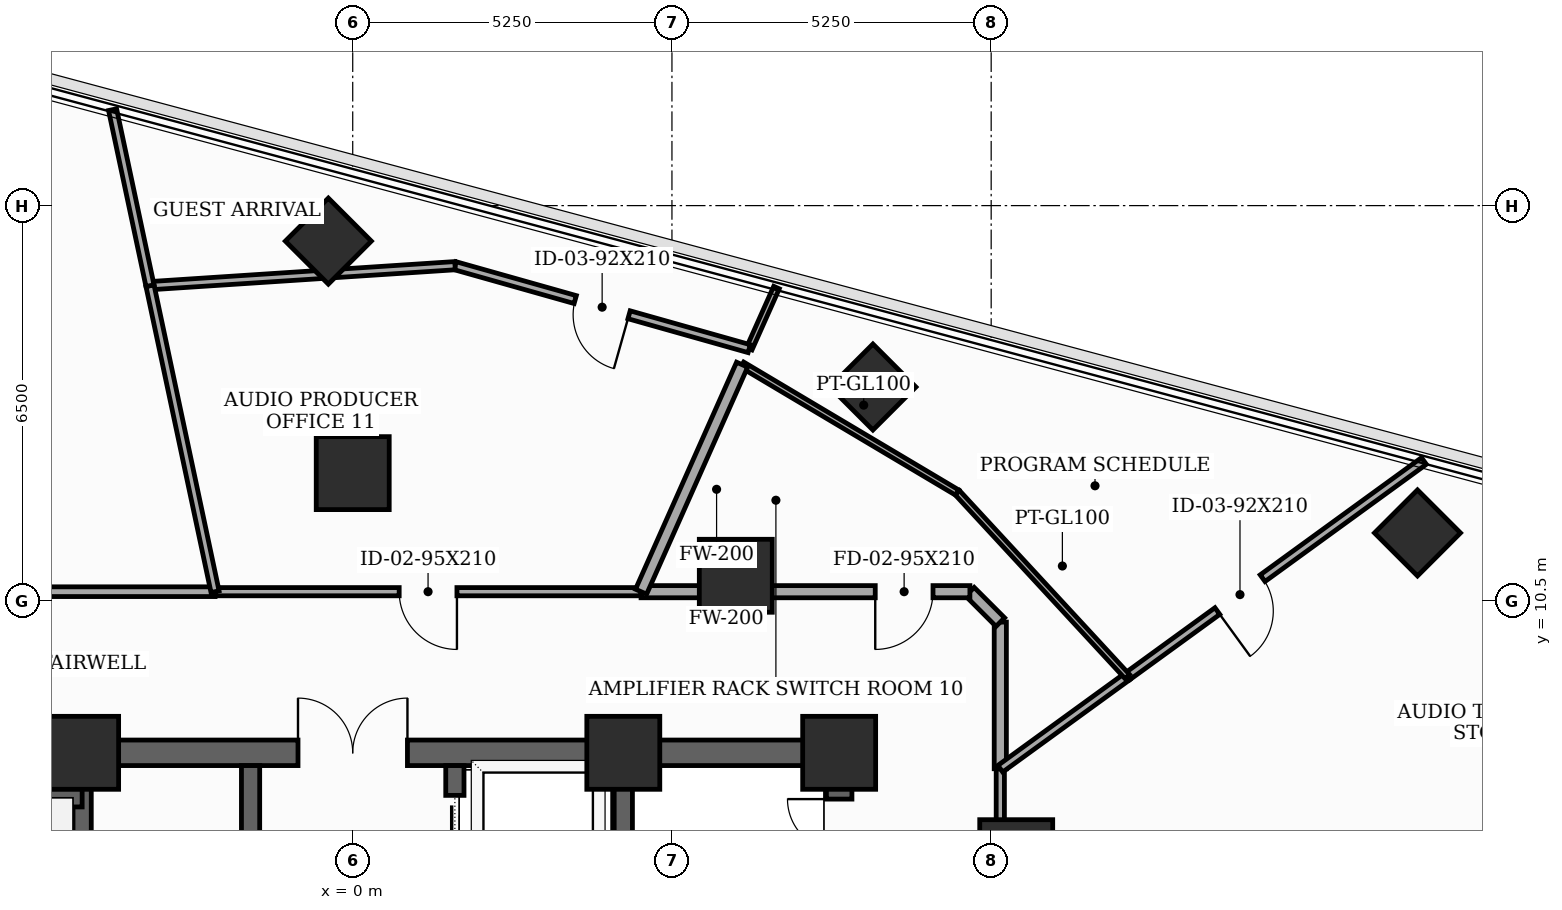
"""IFC4 building model, lengths in metres.
Left out: names, types, materials, properties, quantities, classifications, styles, units other than length and angle.
Written with IfcOpenShell. Run it as: python <this file> out.ifc"""

import sys

from ifc_helpers import new_model, si_unit, direction, frame, frame_2d, origin, origin_2d, place, context, subcontext, project, spatial, rectangle, extrude, element, fill, save


model = new_model("IFC4")
c1 = context("Model", 3, precision=1e-05, world=origin(), true_north=direction((0.0, 1.0)))
c2 = subcontext(c1, "Body", "Model", "MODEL_VIEW")
j1 = project(units=[si_unit("LENGTHUNIT", "METRE"), si_unit("PLANEANGLEUNIT", "RADIAN")], contexts=[c1])
p1 = place(None, origin())
s1 = spatial("IfcSite", under=j1, at=p1, CompositionType="ELEMENT")
p2 = place(p1, origin())
s2 = spatial("IfcBuilding", under=s1, at=p2, CompositionType="ELEMENT")
p3 = place(p2, frame((0.0, 0.0, 187.9)))
s3 = spatial("IfcBuildingStorey", under=s2, at=p3, CompositionType="ELEMENT", Elevation=187.9)
for number, where, z_axis, x_axis in (
    (1, (8.0, 8.0, 0.0), (0.0, 0.0, 1.0), (1.0, 0.0, 0.0)),
    (2, (4.45, 8.0, 0.0), (0.0, 0.0, 1.0), (1.0, 0.0, 0.0)),
    (3, (-4.45, 8.0, 0.0), (0.0, 0.0, 1.0), (1.0, 0.0, 0.0)),
    (4, (10.912, 6.3, 0.0), (0.0, 0.0, 1.0), (1.0, 0.0, 0.0)),
    (5, (6.3, 10.912, 0.0), (0.0, 0.0, 1.0), (1.0, 0.0, 0.0)),
    (6, (0.0, 12.6, 0.0), (0.0, 0.0, 1.0), (1.0, 0.0, 0.0)),
):
    element("IfcColumn", number, at=place(p3, frame(where, z_axis=z_axis, x_axis=x_axis)), inside=s3, PredefinedType="COLUMN", context=c2, shape_type="SweptSolid", body=[
        extrude(rectangle(XDim=1.2, YDim=1.2, at=origin_2d()), origin(), (0.0, 0.0, 1.0), 3.7),
    ])
for number, where, z_axis, x_axis in (
    (7, (17.511, 11.616, 0.0), (0.0, 0.0, 1.0), (0.707, 0.707, 0.0)),
    (8, (8.555, 14.016, 0.0), (0.0, 0.0, 1.0), (0.707, 0.707, 0.0)),
    (9, (-0.401, 16.416, 0.0), (0.0, 0.0, 1.0), (0.707, 0.707, 0.0)),
):
    element("IfcColumn", number, at=place(p3, frame(where, z_axis=z_axis, x_axis=x_axis)), inside=s3, PredefinedType="COLUMN", context=c2, shape_type="SweptSolid", body=[
        extrude(rectangle(XDim=1.0, YDim=1.0, at=origin_2d()), origin(), (0.0, 0.0, 1.0), 3.7),
    ])
p4 = place(p3, frame((8.0, -8.0, 0.0), z_axis=(0.0, 0.0, 1.0), x_axis=(0.0, 1.0, 0.0)))
e10 = element("IfcWall", 10, at=p4, inside=s3, PredefinedType="SHEAR", context=c2, shape_type="SweptSolid", body=[
    extrude(rectangle(XDim=16.0, YDim=0.42, at=frame_2d((8.0, 0.0))), origin(), (0.0, 0.0, 1.0), 3.5),
])
p5 = place(p4, frame((9.6, 0.0, 0.0)))
e11 = element("IfcOpeningElement", 11, at=p5, cuts=e10, PredefinedType="OPENING", context=c2, shape_type="SweptSolid", body=[
    extrude(rectangle(XDim=1.05, YDim=2.15, at=frame_2d((0.525, 1.075))), frame((0.0, 0.22, 0.0), z_axis=(0.0, -1.0, 0.0), x_axis=(1.0, 0.0, 0.0)), (0.0, 0.0, 1.0), 0.44),
])
p6 = place(p4, frame((14.389, 0.0, 0.0)))
e12 = element("IfcOpeningElement", 12, at=p6, cuts=e10, PredefinedType="OPENING", context=c2, shape_type="SweptSolid", body=[
    extrude(rectangle(XDim=0.85, YDim=2.02, at=frame_2d((0.425, 1.01))), frame((0.0, 0.22, 0.0), z_axis=(0.0, -1.0, 0.0), x_axis=(1.0, 0.0, 0.0)), (0.0, 0.0, 1.0), 0.44),
])
p7 = place(p3, frame((-8.0, 8.0, 0.0), z_axis=(0.0, 0.0, 1.0), x_axis=(1.0, 0.0, 0.0)))
e13 = element("IfcWall", 13, at=p7, inside=s3, PredefinedType="SHEAR", context=c2, shape_type="SweptSolid", body=[
    extrude(rectangle(XDim=16.0, YDim=0.42, at=frame_2d((8.0, 0.0))), origin(), (0.0, 0.0, 1.0), 3.5),
])
p8 = place(p7, frame((7.1, 0.0, 0.0)))
e14 = element("IfcOpeningElement", 14, at=p8, cuts=e13, PredefinedType="OPENING", context=c2, shape_type="SweptSolid", body=[
    extrude(rectangle(XDim=1.8, YDim=2.15, at=frame_2d((0.9, 1.075))), frame((0.0, 0.22, 0.0), z_axis=(0.0, -1.0, 0.0), x_axis=(1.0, 0.0, 0.0)), (0.0, 0.0, 1.0), 0.44),
])
for number, where, z_axis, x_axis in (
    (15, (-4.45, -7.79, 0.0), (0.0, 0.0, 1.0), (0.0, 1.0, 0.0)),
    (16, (4.45, -7.79, 0.0), (0.0, 0.0, 1.0), (0.0, 1.0, 0.0)),
):
    element("IfcWall", number, at=place(p3, frame(where, z_axis=z_axis, x_axis=x_axis)), inside=s3, PredefinedType="SHEAR", context=c2, shape_type="SweptSolid", body=[
        extrude(rectangle(XDim=15.58, YDim=0.3, at=frame_2d((7.79, 0.0))), origin(), (0.0, 0.0, 1.0), 3.5),
    ])
p9 = place(p3, frame((-7.79, 7.26, 0.0), z_axis=(0.0, 0.0, 1.0), x_axis=(1.0, 0.0, 0.0)))
e17 = element("IfcWall", 17, at=p9, inside=s3, PredefinedType="SHEAR", context=c2, shape_type="SweptSolid", body=[
    extrude(rectangle(XDim=3.34, YDim=0.3, at=frame_2d((1.67, 0.0))), origin(), (0.0, 0.0, 1.0), 3.5),
])
p10 = place(p3, frame((-1.68, -4.85, 0.0), z_axis=(0.0, 0.0, 1.0), x_axis=(0.0, 1.0, 0.0)))
e18 = element("IfcWall", 18, at=p10, inside=s3, PredefinedType="SHEAR", context=c2, shape_type="SweptSolid", body=[
    extrude(rectangle(XDim=12.64, YDim=0.3, at=frame_2d((6.32, 0.0))), origin(), (0.0, 0.0, 1.0), 3.5),
])
p11 = place(p10, frame((2.6, 0.0, 0.0)))
e19 = element("IfcOpeningElement", 19, at=p11, cuts=e18, PredefinedType="OPENING", context=c2, shape_type="SweptSolid", body=[
    extrude(rectangle(XDim=0.95, YDim=2.1, at=frame_2d((0.475, 1.05))), frame((0.0, 0.16, 0.0), z_axis=(0.0, -1.0, 0.0), x_axis=(1.0, 0.0, 0.0)), (0.0, 0.0, 1.0), 0.32),
])
p12 = place(p10, frame((8.8, 0.0, 0.0)))
e20 = element("IfcOpeningElement", 20, at=p12, cuts=e18, PredefinedType="OPENING", context=c2, shape_type="SweptSolid", body=[
    extrude(rectangle(XDim=0.95, YDim=2.1, at=frame_2d((0.475, 1.05))), frame((0.0, 0.16, 0.0), z_axis=(0.0, -1.0, 0.0), x_axis=(1.0, 0.0, 0.0)), (0.0, 0.0, 1.0), 0.32),
])
p13 = place(p3, frame((1.68, -4.85, 0.0), z_axis=(0.0, 0.0, 1.0), x_axis=(0.0, 1.0, 0.0)))
e21 = element("IfcWall", 21, at=p13, inside=s3, PredefinedType="SHEAR", context=c2, shape_type="SweptSolid", body=[
    extrude(rectangle(XDim=12.64, YDim=0.3, at=frame_2d((6.32, 0.0))), origin(), (0.0, 0.0, 1.0), 3.5),
])
p14 = place(p13, frame((0.55, 0.0, 0.0)))
e22 = element("IfcOpeningElement", 22, at=p14, cuts=e21, PredefinedType="OPENING", context=c2, shape_type="SweptSolid", body=[
    extrude(rectangle(XDim=1.1, YDim=2.1, at=frame_2d((0.55, 1.05))), frame((0.0, 0.16, 0.0), z_axis=(0.0, -1.0, 0.0), x_axis=(1.0, 0.0, 0.0)), (0.0, 0.0, 1.0), 0.32),
])
p15 = place(p13, frame((2.65, 0.0, 0.0)))
e23 = element("IfcOpeningElement", 23, at=p15, cuts=e21, PredefinedType="OPENING", context=c2, shape_type="SweptSolid", body=[
    extrude(rectangle(XDim=1.1, YDim=2.1, at=frame_2d((0.55, 1.05))), frame((0.0, 0.16, 0.0), z_axis=(0.0, -1.0, 0.0), x_axis=(1.0, 0.0, 0.0)), (0.0, 0.0, 1.0), 0.32),
])
p16 = place(p13, frame((4.75, 0.0, 0.0)))
e24 = element("IfcOpeningElement", 24, at=p16, cuts=e21, PredefinedType="OPENING", context=c2, shape_type="SweptSolid", body=[
    extrude(rectangle(XDim=1.1, YDim=2.1, at=frame_2d((0.55, 1.05))), frame((0.0, 0.16, 0.0), z_axis=(0.0, -1.0, 0.0), x_axis=(1.0, 0.0, 0.0)), (0.0, 0.0, 1.0), 0.32),
])
p17 = place(p13, frame((6.85, 0.0, 0.0)))
e25 = element("IfcOpeningElement", 25, at=p17, cuts=e21, PredefinedType="OPENING", context=c2, shape_type="SweptSolid", body=[
    extrude(rectangle(XDim=1.1, YDim=2.1, at=frame_2d((0.55, 1.05))), frame((0.0, 0.16, 0.0), z_axis=(0.0, -1.0, 0.0), x_axis=(1.0, 0.0, 0.0)), (0.0, 0.0, 1.0), 0.32),
])
p18 = place(p13, frame((8.95, 0.0, 0.0)))
e26 = element("IfcOpeningElement", 26, at=p18, cuts=e21, PredefinedType="OPENING", context=c2, shape_type="SweptSolid", body=[
    extrude(rectangle(XDim=1.1, YDim=2.1, at=frame_2d((0.55, 1.05))), frame((0.0, 0.16, 0.0), z_axis=(0.0, -1.0, 0.0), x_axis=(1.0, 0.0, 0.0)), (0.0, 0.0, 1.0), 0.32),
])
p19 = place(p13, frame((11.05, 0.0, 0.0)))
e27 = element("IfcOpeningElement", 27, at=p19, cuts=e21, PredefinedType="OPENING", context=c2, shape_type="SweptSolid", body=[
    extrude(rectangle(XDim=1.1, YDim=2.1, at=frame_2d((0.55, 1.05))), frame((0.0, 0.16, 0.0), z_axis=(0.0, -1.0, 0.0), x_axis=(1.0, 0.0, 0.0)), (0.0, 0.0, 1.0), 0.32),
])
p20 = place(p3, frame((10.65, 2.45, 0.0), z_axis=(0.0, 0.0, 1.0), x_axis=(0.0, 1.0, 0.0)))
e28 = element("IfcWall", 28, at=p20, inside=s3, PredefinedType="PARTITIONING", context=c2, shape_type="SweptSolid", body=[
    extrude(rectangle(XDim=5.288, YDim=0.135, at=frame_2d((2.644, 0.0))), origin(), (0.0, 0.0, 1.0), 2.885),
])
p21 = place(p20, frame((0.583, 0.0, 0.0)))
e29 = element("IfcOpeningElement", 29, at=p21, cuts=e28, PredefinedType="OPENING", context=c2, shape_type="SweptSolid", body=[
    extrude(rectangle(XDim=0.95, YDim=2.1, at=frame_2d((0.475, 1.05))), frame((0.0, 0.077, 0.0), z_axis=(0.0, -1.0, 0.0), x_axis=(1.0, 0.0, 0.0)), (0.0, 0.0, 1.0), 0.155),
])
p22 = place(p3, frame((10.65, 7.738, 0.0), z_axis=(0.0, 0.0, 1.0), x_axis=(0.0, 1.0, 0.0)))
e30 = element("IfcWall", 30, at=p22, inside=s3, PredefinedType="SOLIDWALL", context=c2, shape_type="SweptSolid", body=[
    extrude(rectangle(XDim=2.412, YDim=0.2, at=frame_2d((1.206, 0.0))), origin(), (0.0, 0.0, 1.0), 3.5),
])
p23 = place(p3, frame((10.65, 10.15, 0.0), z_axis=(0.0, 0.0, 1.0), x_axis=(-0.707106781187, 0.707106781187, 0.0)))
e31 = element("IfcWall", 31, at=p23, inside=s3, PredefinedType="SOLIDWALL", context=c2, shape_type="SweptSolid", body=[
    extrude(rectangle(XDim=0.707, YDim=0.2, at=frame_2d((0.354, 0.0))), origin(), (0.0, 0.0, 1.0), 3.5),
])
p24 = place(p3, frame((10.15, 10.65, 0.0), z_axis=(0.0, 0.0, 1.0), x_axis=(-1.0, 0.0, 0.0)))
e32 = element("IfcWall", 32, at=p24, inside=s3, PredefinedType="SOLIDWALL", context=c2, shape_type="SweptSolid", body=[
    extrude(rectangle(XDim=5.408, YDim=0.2, at=frame_2d((2.704, 0.0))), origin(), (0.0, 0.0, 1.0), 2.885),
])
p25 = place(p24, frame((0.607, 0.0, 0.0)))
e33 = element("IfcOpeningElement", 33, at=p25, cuts=e32, PredefinedType="OPENING", context=c2, shape_type="SweptSolid", body=[
    extrude(rectangle(XDim=0.95, YDim=2.1, at=frame_2d((0.475, 1.05))), frame((0.0, 0.11, 0.0), z_axis=(0.0, -1.0, 0.0), x_axis=(1.0, 0.0, 0.0)), (0.0, 0.0, 1.0), 0.22),
])
p26 = place(p3, frame((4.742, 10.65, 0.0), z_axis=(0.0, 0.0, 1.0), x_axis=(-1.0, 0.0, 0.0)))
e34 = element("IfcWall", 34, at=p26, inside=s3, PredefinedType="PARTITIONING", context=c2, shape_type="SweptSolid", body=[
    extrude(rectangle(XDim=7.006, YDim=0.135, at=frame_2d((3.503, 0.0))), origin(), (0.0, 0.0, 1.0), 2.885),
])
p27 = place(p26, frame((3.028, 0.0, 0.0)))
e35 = element("IfcOpeningElement", 35, at=p27, cuts=e34, PredefinedType="OPENING", context=c2, shape_type="SweptSolid", body=[
    extrude(rectangle(XDim=0.95, YDim=2.1, at=frame_2d((0.475, 1.05))), frame((0.0, 0.077, 0.0), z_axis=(0.0, -1.0, 0.0), x_axis=(1.0, 0.0, 0.0)), (0.0, 0.0, 1.0), 0.155),
])
p28 = place(p3, frame((-2.264, 10.65, 0.0), z_axis=(0.0, 0.0, 1.0), x_axis=(-1.0, 0.0, 0.0)))
e36 = element("IfcWall", 36, at=p28, inside=s3, PredefinedType="PARTITIONING", context=c2, shape_type="SweptSolid", body=[
    extrude(rectangle(XDim=7.886, YDim=0.16, at=frame_2d((3.943, 0.0))), origin(), (0.0, 0.0, 1.0), 2.885),
])
p29 = place(p3, frame((17.617, 12.8, 0.0), z_axis=(0.0, 0.0, 1.0), x_axis=(-0.809021342768, -0.587779267196, 0.0)))
e37 = element("IfcWall", 37, at=p29, inside=s3, PredefinedType="PARTITIONING", context=c2, shape_type="SweptSolid", body=[
    extrude(rectangle(XDim=6.031, YDim=0.135, at=frame_2d((3.015, 0.0))), origin(), (0.0, 0.0, 1.0), 2.985),
])
p30 = place(p29, frame((3.279, 0.0, 0.0)))
e38 = element("IfcOpeningElement", 38, at=p30, cuts=e37, PredefinedType="OPENING", context=c2, shape_type="SweptSolid", body=[
    extrude(rectangle(XDim=0.92, YDim=2.1, at=frame_2d((0.46, 1.05))), frame((0.0, 0.077, 0.0), z_axis=(0.0, -1.0, 0.0), x_axis=(1.0, 0.0, 0.0)), (0.0, 0.0, 1.0), 0.155),
])
p31 = place(p3, frame((12.738, 9.255, 0.0), z_axis=(0.0, 0.0, 1.0), x_axis=(-0.809067292609, -0.587716016483, 0.0)))
e39 = element("IfcWall", 39, at=p31, inside=s3, PredefinedType="PARTITIONING", context=c2, shape_type="SweptSolid", body=[
    extrude(rectangle(XDim=2.581, YDim=0.135, at=frame_2d((1.291, 0.0))), origin(), (0.0, 0.0, 1.0), 3.5),
])
p32 = place(p3, frame((6.404, 14.384, 0.0), z_axis=(0.0, 0.0, 1.0), x_axis=(0.859464079119, -0.511196143085, 0.0)))
e40 = element("IfcWall", 40, at=p32, inside=s3, PredefinedType="MOVABLE", context=c2, shape_type="SweptSolid", body=[
    extrude(rectangle(XDim=4.118, YDim=0.1, at=frame_2d((2.059, 0.0))), origin(), (0.0, 0.0, 1.0), 2.975),
])
p33 = place(p3, frame((9.943, 12.279, 0.0), z_axis=(0.0, 0.0, 1.0), x_axis=(0.678723214903, -0.734394170423, 0.0)))
e41 = element("IfcWall", 41, at=p33, inside=s3, PredefinedType="MOVABLE", context=c2, shape_type="SweptSolid", body=[
    extrude(rectangle(XDim=4.118, YDim=0.1, at=frame_2d((2.059, 0.0))), origin(), (0.0, 0.0, 1.0), 3.5),
])
p34 = place(p3, frame((6.969, 15.653, 0.0), z_axis=(0.0, 0.0, 1.0), x_axis=(-0.407125799041, -0.913372094907, 0.0)))
e42 = element("IfcWall", 42, at=p34, inside=s3, PredefinedType="MOVABLE", context=c2, shape_type="SweptSolid", body=[
    extrude(rectangle(XDim=1.101, YDim=0.1, at=frame_2d((0.551, 0.0))), origin(), (0.0, 0.0, 1.0), 2.975),
])
p35 = place(p3, frame((6.404, 14.384, 0.0), z_axis=(0.0, 0.0, 1.0), x_axis=(-0.406648271104, -0.913584798258, 0.0)))
e43 = element("IfcWall", 43, at=p35, inside=s3, PredefinedType="SOLIDWALL", context=c2, shape_type="SweptSolid", body=[
    extrude(rectangle(XDim=4.087, YDim=0.2, at=frame_2d((2.044, 0.0))), origin(), (0.0, 0.0, 1.0), 2.885),
])
p36 = place(p3, frame((6.521, 14.647, 0.0), z_axis=(0.0, 0.0, 1.0), x_axis=(-0.962425920656, 0.271544374364, 0.0)))
e44 = element("IfcWall", 44, at=p36, inside=s3, PredefinedType="PARTITIONING", context=c2, shape_type="SweptSolid", body=[
    extrude(rectangle(XDim=5.027, YDim=0.135, at=frame_2d((2.513, 0.0))), origin(), (0.0, 0.0, 1.0), 2.975),
])
p37 = place(p36, frame((2.053, 0.0, 0.0)))
e45 = element("IfcOpeningElement", 45, at=p37, cuts=e44, PredefinedType="OPENING", context=c2, shape_type="SweptSolid", body=[
    extrude(rectangle(XDim=0.92, YDim=2.1, at=frame_2d((0.46, 1.05))), frame((0.0, 0.077, 0.0), z_axis=(0.0, -1.0, 0.0), x_axis=(1.0, 0.0, 0.0)), (0.0, 0.0, 1.0), 0.155),
])
p38 = place(p3, frame((1.683, 16.012, 0.0), z_axis=(0.0, 0.0, 1.0), x_axis=(-0.997858663881, -0.065407086143, 0.0)))
e46 = element("IfcWall", 46, at=p38, inside=s3, PredefinedType="PARTITIONING", context=c2, shape_type="SweptSolid", body=[
    extrude(rectangle(XDim=5.028, YDim=0.135, at=frame_2d((2.514, 0.0))), origin(), (0.0, 0.0, 1.0), 2.975),
])
p39 = place(p3, frame((-3.334, 15.683, 0.0), z_axis=(0.0, 0.0, 1.0), x_axis=(0.207954085813, -0.978138588439, 0.0)))
e47 = element("IfcWall", 47, at=p39, inside=s3, PredefinedType="PARTITIONING", context=c2, shape_type="SweptSolid", body=[
    extrude(rectangle(XDim=5.146, YDim=0.135, at=frame_2d((2.573, 0.0))), origin(), (0.0, 0.0, 1.0), 2.885),
])
p40 = place(p3, frame((-3.949, 18.578, 0.0), z_axis=(0.0, 0.0, 1.0), x_axis=(0.207951490347, -0.978139140236, 0.0)))
e48 = element("IfcWall", 48, at=p40, inside=s3, PredefinedType="PARTITIONING", context=c2, shape_type="SweptSolid", body=[
    extrude(rectangle(XDim=2.96, YDim=0.135, at=frame_2d((1.48, 0.0))), origin(), (0.0, 0.0, 1.0), 2.975),
])
p41 = place(p6, origin())
e49 = element("IfcDoor", 49, at=p41, inside=s3, OperationType="SINGLE_SWING_RIGHT", PredefinedType="TRAPDOOR", context=c2, shape_type="SweptSolid", body=[
    extrude(rectangle(XDim=0.85, YDim=2.02, at=frame_2d((0.425, 1.01))), frame((0.0, 0.025, 0.0), z_axis=(0.0, -1.0, 0.0), x_axis=(1.0, 0.0, 0.0)), (0.0, 0.0, 1.0), 0.05),
])
fill(e12, e49)
p42 = place(p8, origin())
e50 = element("IfcDoor", 50, at=p42, inside=s3, OperationType="DOUBLE_DOOR_SINGLE_SWING", PredefinedType="DOOR", context=c2, shape_type="SweptSolid", body=[
    extrude(rectangle(XDim=1.8, YDim=2.15, at=frame_2d((0.9, 1.075))), frame((0.0, 0.025, 0.0), z_axis=(0.0, -1.0, 0.0), x_axis=(1.0, 0.0, 0.0)), (0.0, 0.0, 1.0), 0.05),
])
fill(e14, e50)
p43 = place(p19, origin())
e51 = element("IfcDoor", 51, at=p43, inside=s3, OperationType="SLIDING_TO_LEFT", PredefinedType="DOOR", context=c2, shape_type="SweptSolid", body=[
    extrude(rectangle(XDim=1.1, YDim=2.1, at=frame_2d((0.55, 1.05))), frame((0.0, 0.025, 0.0), z_axis=(0.0, -1.0, 0.0), x_axis=(1.0, 0.0, 0.0)), (0.0, 0.0, 1.0), 0.05),
])
fill(e27, e51)
p44 = place(p25, origin())
e52 = element("IfcDoor", 52, at=p44, inside=s3, OperationType="SINGLE_SWING_RIGHT", PredefinedType="DOOR", context=c2, shape_type="SweptSolid", body=[
    extrude(rectangle(XDim=0.95, YDim=2.1, at=frame_2d((0.475, 1.05))), frame((0.0, 0.025, 0.0), z_axis=(0.0, -1.0, 0.0), x_axis=(1.0, 0.0, 0.0)), (0.0, 0.0, 1.0), 0.05),
])
fill(e33, e52)
p45 = place(p27, origin())
e53 = element("IfcDoor", 53, at=p45, inside=s3, OperationType="SINGLE_SWING_LEFT", PredefinedType="DOOR", context=c2, shape_type="SweptSolid", body=[
    extrude(rectangle(XDim=0.95, YDim=2.1, at=frame_2d((0.475, 1.05))), frame((0.0, 0.025, 0.0), z_axis=(0.0, -1.0, 0.0), x_axis=(1.0, 0.0, 0.0)), (0.0, 0.0, 1.0), 0.05),
])
fill(e35, e53)
p46 = place(p30, origin())
e54 = element("IfcDoor", 54, at=p46, inside=s3, OperationType="SINGLE_SWING_RIGHT", PredefinedType="DOOR", context=c2, shape_type="SweptSolid", body=[
    extrude(rectangle(XDim=0.92, YDim=2.1, at=frame_2d((0.46, 1.05))), frame((0.0, 0.025, 0.0), z_axis=(0.0, -1.0, 0.0), x_axis=(1.0, 0.0, 0.0)), (0.0, 0.0, 1.0), 0.05),
])
fill(e38, e54)
p47 = place(p37, origin())
e55 = element("IfcDoor", 55, at=p47, inside=s3, OperationType="SINGLE_SWING_LEFT", PredefinedType="DOOR", context=c2, shape_type="SweptSolid", body=[
    extrude(rectangle(XDim=0.92, YDim=2.1, at=frame_2d((0.46, 1.05))), frame((0.0, 0.025, 0.0), z_axis=(0.0, -1.0, 0.0), x_axis=(1.0, 0.0, 0.0)), (0.0, 0.0, 1.0), 0.05),
])
fill(e45, e55)
save(model, sys.argv[1])
